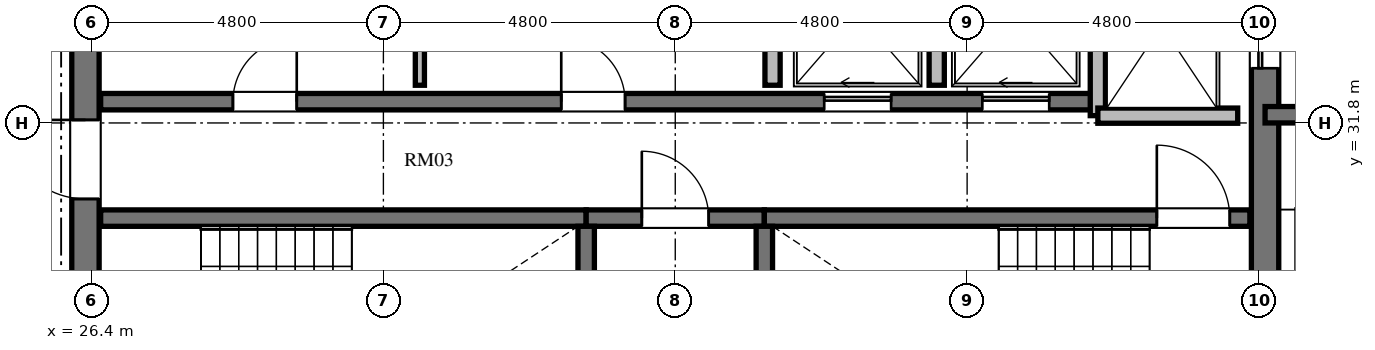
"""IFC4 building model, lengths in metres.
Left out: names, types, materials, properties, quantities, classifications, styles, units other than length and angle.
Written with IfcOpenShell. Run it as: python <this file> out.ifc"""

import sys

from ifc_helpers import new_model, si_unit, direction, frame, frame_2d, origin, place, context, subcontext, project, spatial, rectangle, extrude, element, fill, save


model = new_model("IFC4")
c1 = context("Model", 3, precision=1e-05, world=origin(), true_north=direction((0.0, 1.0)))
c2 = subcontext(c1, "Body", "Model", "MODEL_VIEW")
j1 = project(units=[si_unit("LENGTHUNIT", "METRE"), si_unit("PLANEANGLEUNIT", "RADIAN")], contexts=[c1])
p1 = place(None, origin())
s1 = spatial("IfcSite", under=j1, at=p1, CompositionType="ELEMENT")
p2 = place(p1, origin())
s2 = spatial("IfcBuilding", under=s1, at=p2, CompositionType="ELEMENT")
p3 = place(p2, frame((0.0, 0.0, 245.904)))
s3 = spatial("IfcBuildingStorey", under=s2, at=p3, CompositionType="ELEMENT", Elevation=245.904)
p4 = place(p3, frame((26.3, 20.95, 0.0), z_axis=(0.0, 0.0, 1.0), x_axis=(0.0, 1.0, 0.0)))
e1 = element("IfcWall", 1, at=p4, inside=s3, PredefinedType="SHEAR", context=c2, shape_type="SweptSolid", body=[
    extrude(rectangle(XDim=14.1, YDim=0.45, at=frame_2d((7.05, 0.0))), origin(), (0.0, 0.0, 1.0), 5.472),
])
p5 = place(p4, frame((6.5, 0.0, 0.0)))
e2 = element("IfcOpeningElement", 2, at=p5, cuts=e1, PredefinedType="OPENING", context=c2, shape_type="SweptSolid", body=[
    extrude(rectangle(XDim=1.2, YDim=2.15, at=frame_2d((0.6, 1.075))), frame((0.0, 0.235, 0.0), z_axis=(0.0, -1.0, 0.0), x_axis=(1.0, 0.0, 0.0)), (0.0, 0.0, 1.0), 0.47),
])
p6 = place(p4, frame((9.6, 0.0, 0.0)))
e3 = element("IfcOpeningElement", 3, at=p6, cuts=e1, PredefinedType="OPENING", context=c2, shape_type="SweptSolid", body=[
    extrude(rectangle(XDim=1.3, YDim=2.2, at=frame_2d((0.65, 1.1))), frame((0.0, 0.235, 0.0), z_axis=(0.0, -1.0, 0.0), x_axis=(1.0, 0.0, 0.0)), (0.0, 0.0, 1.0), 0.47),
])
p7 = place(p4, frame((3.26, 0.0, 0.0)))
e4 = element("IfcOpeningElement", 4, at=p7, cuts=e1, PredefinedType="OPENING", context=c2, shape_type="SweptSolid", body=[
    extrude(rectangle(XDim=1.3, YDim=2.2, at=frame_2d((0.65, 1.1))), frame((0.0, 0.235, 0.0), z_axis=(0.0, -1.0, 0.0), x_axis=(1.0, 0.0, 0.0)), (0.0, 0.0, 1.0), 0.47),
])
p8 = place(p3, frame((45.7, 20.95, 0.0), z_axis=(0.0, 0.0, 1.0), x_axis=(0.0, 1.0, 0.0)))
e5 = element("IfcWall", 5, at=p8, inside=s3, PredefinedType="SHEAR", context=c2, shape_type="SweptSolid", body=[
    extrude(rectangle(XDim=14.1, YDim=0.45, at=frame_2d((7.05, 0.0))), origin(), (0.0, 0.0, 1.0), 5.472),
])
p9 = place(p8, frame((11.75, 0.0, 0.0)))
e6 = element("IfcOpeningElement", 6, at=p9, cuts=e5, PredefinedType="OPENING", context=c2, shape_type="SweptSolid", body=[
    extrude(rectangle(XDim=1.4, YDim=2.3, at=frame_2d((0.7, 1.15))), frame((0.0, 0.235, 0.0), z_axis=(0.0, -1.0, 0.0), x_axis=(1.0, 0.0, 0.0)), (0.0, 0.0, 1.0), 0.47),
])
p10 = place(p8, frame((0.95, 0.0, 0.0)))
e7 = element("IfcOpeningElement", 7, at=p10, cuts=e5, PredefinedType="OPENING", context=c2, shape_type="SweptSolid", body=[
    extrude(rectangle(XDim=1.4, YDim=2.3, at=frame_2d((0.7, 1.15))), frame((0.0, 0.235, 0.0), z_axis=(0.0, -1.0, 0.0), x_axis=(1.0, 0.0, 0.0)), (0.0, 0.0, 1.0), 0.47),
])
p11 = place(p3, frame((26.55, 30.235, 0.0), z_axis=(0.0, 0.0, 1.0), x_axis=(1.0, 0.0, 0.0)))
e8 = element("IfcWall", 8, at=p11, inside=s3, PredefinedType="SHEAR", context=c2, shape_type="SweptSolid", body=[
    extrude(rectangle(XDim=7.985, YDim=0.27, at=frame_2d((3.992, 0.0))), origin(), (0.0, 0.0, 1.0), 5.472),
])
p12 = place(p3, frame((34.535, 30.235, 0.0), z_axis=(0.0, 0.0, 1.0), x_axis=(1.0, 0.0, 0.0)))
e9 = element("IfcWall", 9, at=p12, inside=s3, PredefinedType="SHEAR", context=c2, shape_type="SweptSolid", body=[
    extrude(rectangle(XDim=2.93, YDim=0.27, at=frame_2d((1.465, 0.0))), origin(), (0.0, 0.0, 1.0), 5.472),
])
p13 = place(p12, frame((0.915, 0.0, 0.0)))
e10 = element("IfcOpeningElement", 10, at=p13, cuts=e9, PredefinedType="OPENING", context=c2, shape_type="SweptSolid", body=[
    extrude(rectangle(XDim=1.1, YDim=2.15, at=frame_2d((0.55, 1.075))), frame((0.0, 0.145, 0.0), z_axis=(0.0, -1.0, 0.0), x_axis=(1.0, 0.0, 0.0)), (0.0, 0.0, 1.0), 0.29),
])
p14 = place(p3, frame((37.465, 30.235, 0.0), z_axis=(0.0, 0.0, 1.0), x_axis=(1.0, 0.0, 0.0)))
e11 = element("IfcWall", 11, at=p14, inside=s3, PredefinedType="SHEAR", context=c2, shape_type="SweptSolid", body=[
    extrude(rectangle(XDim=7.985, YDim=0.27, at=frame_2d((3.992, 0.0))), origin(), (0.0, 0.0, 1.0), 5.472),
])
p15 = place(p14, frame((6.455, 0.0, 0.0)))
e12 = element("IfcOpeningElement", 12, at=p15, cuts=e11, PredefinedType="OPENING", context=c2, shape_type="SweptSolid", body=[
    extrude(rectangle(XDim=1.2, YDim=2.15, at=frame_2d((0.6, 1.075))), frame((0.0, 0.145, 0.0), z_axis=(0.0, -1.0, 0.0), x_axis=(1.0, 0.0, 0.0)), (0.0, 0.0, 1.0), 0.29),
])
for number, where, z_axis, x_axis in (
    (13, (34.535, 26.02, 0.0), (0.0, 0.0, 1.0), (0.0, 1.0, 0.0)),
    (14, (37.465, 26.02, 0.0), (0.0, 0.0, 1.0), (0.0, 1.0, 0.0)),
):
    element("IfcWall", number, at=place(p3, frame(where, z_axis=z_axis, x_axis=x_axis)), inside=s3, PredefinedType="SHEAR", context=c2, shape_type="SweptSolid", body=[
        extrude(rectangle(XDim=4.08, YDim=0.27, at=frame_2d((2.04, 0.0))), origin(), (0.0, 0.0, 1.0), 5.472),
    ])
p16 = place(p3, frame((26.55, 32.15, 0.0), z_axis=(0.0, 0.0, 1.0), x_axis=(1.0, 0.0, 0.0)))
e15 = element("IfcWall", 15, at=p16, inside=s3, PredefinedType="SHEAR", context=c2, shape_type="SweptSolid", body=[
    extrude(rectangle(XDim=16.4, YDim=0.27, at=frame_2d((8.2, 0.0))), origin(), (0.0, 0.0, 1.0), 5.472),
])
p17 = place(p16, frame((2.175, 0.0, 0.0)))
e16 = element("IfcOpeningElement", 16, at=p17, cuts=e15, PredefinedType="OPENING", context=c2, shape_type="SweptSolid", body=[
    extrude(rectangle(XDim=1.05, YDim=2.15, at=frame_2d((0.525, 1.075))), frame((0.0, 0.145, 0.0), z_axis=(0.0, -1.0, 0.0), x_axis=(1.0, 0.0, 0.0)), (0.0, 0.0, 1.0), 0.29),
])
p18 = place(p16, frame((7.575, 0.0, 0.0)))
e17 = element("IfcOpeningElement", 17, at=p18, cuts=e15, PredefinedType="OPENING", context=c2, shape_type="SweptSolid", body=[
    extrude(rectangle(XDim=1.05, YDim=2.15, at=frame_2d((0.525, 1.075))), frame((0.0, 0.145, 0.0), z_axis=(0.0, -1.0, 0.0), x_axis=(1.0, 0.0, 0.0)), (0.0, 0.0, 1.0), 0.29),
])
p19 = place(p16, frame((11.9, 0.0, 0.0)))
e18 = element("IfcOpeningElement", 18, at=p19, cuts=e15, PredefinedType="OPENING", context=c2, shape_type="SweptSolid", body=[
    extrude(rectangle(XDim=1.1, YDim=2.2, at=frame_2d((0.55, 1.1))), frame((0.0, 0.145, 0.0), z_axis=(0.0, -1.0, 0.0), x_axis=(1.0, 0.0, 0.0)), (0.0, 0.0, 1.0), 0.29),
])
p20 = place(p16, frame((14.5, 0.0, 0.0)))
e19 = element("IfcOpeningElement", 19, at=p20, cuts=e15, PredefinedType="OPENING", context=c2, shape_type="SweptSolid", body=[
    extrude(rectangle(XDim=1.1, YDim=2.2, at=frame_2d((0.55, 1.1))), frame((0.0, 0.145, 0.0), z_axis=(0.0, -1.0, 0.0), x_axis=(1.0, 0.0, 0.0)), (0.0, 0.0, 1.0), 0.29),
])
p21 = place(p3, frame((42.95, 31.92, 0.0), z_axis=(0.0, 0.0, 1.0), x_axis=(0.0, 1.0, 0.0)))
e20 = element("IfcWall", 20, at=p21, inside=s3, PredefinedType="SOLIDWALL", context=c2, shape_type="SweptSolid", body=[
    extrude(rectangle(XDim=3.18, YDim=0.25, at=frame_2d((1.59, 0.0))), origin(), (0.0, 0.0, 1.0), 5.272),
])
p22 = place(p3, frame((42.95, 31.92, 0.0), z_axis=(0.0, 0.0, 1.0), x_axis=(1.0, 0.0, 0.0)))
e21 = element("IfcWall", 21, at=p22, inside=s3, PredefinedType="SOLIDWALL", context=c2, shape_type="SweptSolid", body=[
    extrude(rectangle(XDim=2.3, YDim=0.25, at=frame_2d((1.15, 0.0))), origin(), (0.0, 0.0, 1.0), 5.272),
])
for number, where, z_axis, x_axis in (
    (22, (37.6, 32.42, 0.0), (0.0, 0.0, 1.0), (0.0, 1.0, 0.0)),
    (23, (40.3, 32.42, 0.0), (0.0, 0.0, 1.0), (0.0, 1.0, 0.0)),
):
    element("IfcWall", number, at=place(p3, frame(where, z_axis=z_axis, x_axis=x_axis)), inside=s3, PredefinedType="SOLIDWALL", context=c2, shape_type="SweptSolid", body=[
        extrude(rectangle(XDim=2.68, YDim=0.25, at=frame_2d((1.34, 0.0))), origin(), (0.0, 0.0, 1.0), 5.272),
    ])
p23 = place(p3, frame((31.8, 32.42, 0.0), z_axis=(0.0, 0.0, 1.0), x_axis=(0.0, 1.0, 0.0)))
e24 = element("IfcWall", 24, at=p23, inside=s3, PredefinedType="PARTITIONING", context=c2, shape_type="SweptSolid", body=[
    extrude(rectangle(XDim=2.68, YDim=0.15, at=frame_2d((1.34, 0.0))), origin(), (0.0, 0.0, 1.0), 5.272),
])
p24 = place(p3, frame((45.7, 31.935, 0.0), z_axis=(0.0, 0.0, 1.0), x_axis=(1.0, 0.0, 0.0)))
e25 = element("IfcWall", 25, at=p24, inside=s3, PredefinedType="SHEAR", context=c2, shape_type="SweptSolid", body=[
    extrude(rectangle(XDim=4.715, YDim=0.27, at=frame_2d((2.357, 0.0))), origin(), (0.0, 0.0, 1.0), 5.472),
])
p25 = place(p15, origin())
e26 = element("IfcDoor", 26, at=p25, inside=s3, OperationType="SINGLE_SWING_LEFT", PredefinedType="DOOR", context=c2, shape_type="SweptSolid", body=[
    extrude(rectangle(XDim=1.2, YDim=2.15, at=frame_2d((0.6, 1.075))), frame((0.0, 0.025, 0.0), z_axis=(0.0, -1.0, 0.0), x_axis=(1.0, 0.0, 0.0)), (0.0, 0.0, 1.0), 0.05),
])
fill(e12, e26)
p26 = place(p13, origin())
e27 = element("IfcDoor", 27, at=p26, inside=s3, OperationType="SINGLE_SWING_LEFT", PredefinedType="DOOR", context=c2, shape_type="SweptSolid", body=[
    extrude(rectangle(XDim=1.1, YDim=2.15, at=frame_2d((0.55, 1.075))), frame((0.0, 0.025, 0.0), z_axis=(0.0, -1.0, 0.0), x_axis=(1.0, 0.0, 0.0)), (0.0, 0.0, 1.0), 0.05),
])
fill(e10, e27)
p27 = place(p6, origin())
e28 = element("IfcDoor", 28, at=p27, inside=s3, OperationType="SINGLE_SWING_RIGHT", PredefinedType="DOOR", context=c2, shape_type="SweptSolid", body=[
    extrude(rectangle(XDim=1.3, YDim=2.2, at=frame_2d((0.65, 1.1))), frame((0.0, 0.025, 0.0), z_axis=(0.0, -1.0, 0.0), x_axis=(1.0, 0.0, 0.0)), (0.0, 0.0, 1.0), 0.05),
])
fill(e3, e28)
p28 = place(p17, origin())
e29 = element("IfcDoor", 29, at=p28, inside=s3, OperationType="SINGLE_SWING_RIGHT", PredefinedType="DOOR", context=c2, shape_type="SweptSolid", body=[
    extrude(rectangle(XDim=1.05, YDim=2.15, at=frame_2d((0.525, 1.075))), frame((0.0, 0.025, 0.0), z_axis=(0.0, -1.0, 0.0), x_axis=(1.0, 0.0, 0.0)), (0.0, 0.0, 1.0), 0.05),
])
fill(e16, e29)
p29 = place(p18, origin())
e30 = element("IfcDoor", 30, at=p29, inside=s3, OperationType="SINGLE_SWING_LEFT", PredefinedType="DOOR", context=c2, shape_type="SweptSolid", body=[
    extrude(rectangle(XDim=1.05, YDim=2.15, at=frame_2d((0.525, 1.075))), frame((0.0, 0.025, 0.0), z_axis=(0.0, -1.0, 0.0), x_axis=(1.0, 0.0, 0.0)), (0.0, 0.0, 1.0), 0.05),
])
fill(e17, e30)
p30 = place(p19, origin())
e31 = element("IfcDoor", 31, at=p30, inside=s3, OperationType="SLIDING_TO_LEFT", PredefinedType="DOOR", context=c2, shape_type="SweptSolid", body=[
    extrude(rectangle(XDim=1.1, YDim=2.2, at=frame_2d((0.55, 1.1))), frame((0.0, 0.025, 0.0), z_axis=(0.0, -1.0, 0.0), x_axis=(1.0, 0.0, 0.0)), (0.0, 0.0, 1.0), 0.05),
])
fill(e18, e31)
p31 = place(p20, origin())
e32 = element("IfcDoor", 32, at=p31, inside=s3, OperationType="SLIDING_TO_LEFT", PredefinedType="DOOR", context=c2, shape_type="SweptSolid", body=[
    extrude(rectangle(XDim=1.1, YDim=2.2, at=frame_2d((0.55, 1.1))), frame((0.0, 0.025, 0.0), z_axis=(0.0, -1.0, 0.0), x_axis=(1.0, 0.0, 0.0)), (0.0, 0.0, 1.0), 0.05),
])
fill(e19, e32)
p32 = place(p9, origin())
e33 = element("IfcDoor", 33, at=p32, inside=s3, OperationType="SLIDING_TO_LEFT", PredefinedType="DOOR", context=c2, shape_type="SweptSolid", body=[
    extrude(rectangle(XDim=1.4, YDim=2.3, at=frame_2d((0.7, 1.15))), frame((0.0, 0.025, 0.0), z_axis=(0.0, -1.0, 0.0), x_axis=(1.0, 0.0, 0.0)), (0.0, 0.0, 1.0), 0.05),
])
fill(e6, e33)
save(model, sys.argv[1])
